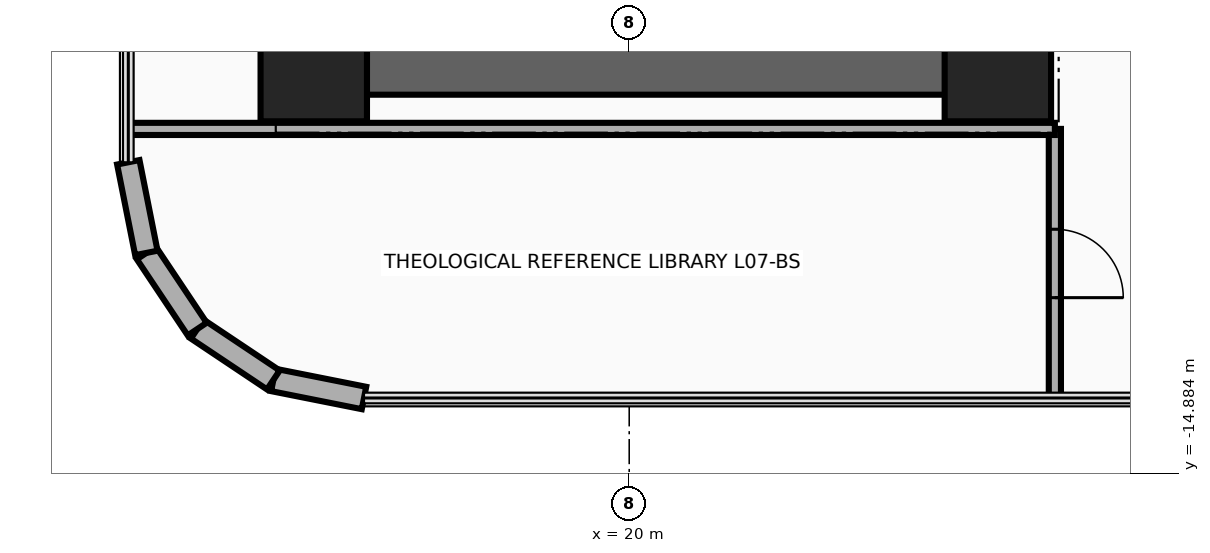
"""IFC4 building model, lengths in metres.
Left out: names, types, materials, properties, quantities, classifications, styles, units other than length and angle.
Written with IfcOpenShell. Run it as: python <this file> out.ifc"""

import sys

from ifc_helpers import new_model, si_unit, direction, frame, frame_2d, origin, origin_2d, place, context, subcontext, project, spatial, rectangle, extrude, source, transform, mapped, element, fill, save


model = new_model("IFC4")
c1 = context("Model", 3, precision=1e-05, world=origin(), true_north=direction((0.0, 1.0)))
c2 = subcontext(c1, "Body", "Model", "MODEL_VIEW")
j1 = project(units=[si_unit("LENGTHUNIT", "METRE"), si_unit("PLANEANGLEUNIT", "RADIAN")], contexts=[c1])
p1 = place(None, origin())
s1 = spatial("IfcSite", under=j1, at=p1, CompositionType="ELEMENT")
p2 = place(p1, origin())
s2 = spatial("IfcBuilding", under=s1, at=p2, CompositionType="ELEMENT")
p3 = place(p2, frame((0.0, 0.0, 33.4)))
s3 = spatial("IfcBuildingStorey", under=s2, at=p3, CompositionType="ELEMENT", Elevation=33.4)
p4 = place(p3, frame((24.85, -9.9, 0.0), z_axis=(0.0, 0.0, 1.0), x_axis=(0.0, 1.0, 0.0)))
e1 = element("IfcWall", 1, at=p4, inside=s3, PredefinedType="SHEAR", context=c2, shape_type="SweptSolid", body=[
    extrude(rectangle(XDim=8.95, YDim=0.7, at=frame_2d((4.475, 0.0))), origin(), (0.0, 0.0, 1.0), 3.46),
])
p5 = place(p3, frame((15.85, -9.55, 0.0), z_axis=(0.0, 0.0, 1.0), x_axis=(1.0, 0.0, 0.0)))
e2 = element("IfcWall", 2, at=p5, inside=s3, PredefinedType="SHEAR", context=c2, shape_type="SweptSolid", body=[
    extrude(rectangle(XDim=9.0, YDim=0.7, at=frame_2d((4.5, 0.0))), origin(), (0.0, 0.0, 1.0), 3.46),
])
m1 = source(origin(), c2, "Body", "SweptSolid", [
    extrude(rectangle(XDim=1.4, YDim=1.4, at=origin_2d()), origin(), (0.0, 0.0, 1.0), 3.7),
])
for number, where, z_axis, x_axis in (
    (3, (15.85, -9.55, 0.0), (0.0, 0.0, 1.0), (1.0, 0.0, 0.0)),
    (4, (24.85, -9.55, 0.0), (0.0, 0.0, 1.0), (1.0, 0.0, 0.0)),
):
    element("IfcColumn", number, at=place(p3, frame(where, z_axis=z_axis, x_axis=x_axis)), inside=s3, PredefinedType="COLUMN", context=c2, shape_type="MappedRepresentation", body=[
        mapped(m1, transform((0.0, 0.0, 0.0), x_axis=(1.0, 0.0, 0.0), y_axis=(0.0, 1.0, 0.0), z_axis=(0.0, 0.0, 1.0), scale=1.0)),
    ])
p6 = place(p3, frame((16.511, -13.89, 0.0), z_axis=(0.0, 0.0, 1.0), x_axis=(-0.980804027463, 0.194996050505, 0.0)))
e5 = element("IfcWall", 5, at=p6, inside=s3, PredefinedType="SOLIDWALL", context=c2, shape_type="SweptSolid", body=[
    extrude(rectangle(XDim=1.216, YDim=0.3, at=frame_2d((0.608, 0.0))), origin(), (0.0, 0.0, 1.0), 3.46),
])
for number, where, z_axis, x_axis in (
    (6, (15.318, -13.653, 0.0), (0.0, 0.0, 1.0), (-0.831, 0.556, 0.0)),
    (7, (14.317, -12.983, 0.0), (0.0, 0.0, 1.0), (-0.556, 0.831, 0.0)),
):
    element("IfcWall", number, at=place(p3, frame(where, z_axis=z_axis, x_axis=x_axis)), inside=s3, PredefinedType="SOLIDWALL", context=c2, shape_type="SweptSolid", body=[
        extrude(rectangle(XDim=1.205, YDim=0.3, at=frame_2d((0.603, 0.0))), origin(), (0.0, 0.0, 1.0), 3.46),
    ])
p7 = place(p3, frame((13.647, -11.982, 0.0), z_axis=(0.0, 0.0, 1.0), x_axis=(-0.195189223115, 0.980765602568, 0.0)))
e8 = element("IfcWall", 8, at=p7, inside=s3, PredefinedType="SOLIDWALL", context=c2, shape_type="SweptSolid", body=[
    extrude(rectangle(XDim=1.216, YDim=0.3, at=frame_2d((0.608, 0.0))), origin(), (0.0, 0.0, 1.0), 3.46),
])
p8 = place(p3, frame((25.6, -13.89, 0.0), z_axis=(0.0, 0.0, 1.0), x_axis=(0.0, 1.0, 0.0)))
e9 = element("IfcWall", 9, at=p8, inside=s3, PredefinedType="PARTITIONING", context=c2, shape_type="SweptSolid", body=[
    extrude(rectangle(XDim=3.54, YDim=0.16, at=frame_2d((1.77, 0.0))), origin(), (0.0, 0.0, 1.0), 3.46),
])
p9 = place(p8, frame((1.32, 0.0, 0.0)))
e10 = element("IfcOpeningElement", 10, at=p9, cuts=e9, PredefinedType="OPENING", context=c2, shape_type="SweptSolid", body=[
    extrude(rectangle(XDim=0.9, YDim=2.1, at=frame_2d((0.45, 1.05))), frame((0.0, 0.095, 0.0), z_axis=(0.0, -1.0, 0.0), x_axis=(1.0, 0.0, 0.0)), (0.0, 0.0, 1.0), 0.19),
])
p10 = place(p3, frame((13.41, -10.35, 0.0), z_axis=(0.0, 0.0, 1.0), x_axis=(1.0, 0.0, 0.0)))
e11 = element("IfcWall", 11, at=p10, inside=s3, PredefinedType="PARTITIONING", context=c2, shape_type="SweptSolid", body=[
    extrude(rectangle(XDim=12.19, YDim=0.16, at=frame_2d((6.095, 0.0))), origin(), (0.0, 0.0, 1.0), 3.46),
])
p11 = place(p9, frame((0.9, 0.0, 0.0), z_axis=(0.0, 0.0, 1.0), x_axis=(-1.0, 0.0, 0.0)))
e12 = element("IfcDoor", 12, at=p11, inside=s3, OperationType="SINGLE_SWING_LEFT", PredefinedType="DOOR", context=c2, shape_type="SweptSolid", body=[
    extrude(rectangle(XDim=0.9, YDim=2.1, at=frame_2d((0.45, 1.05))), frame((0.0, 0.025, 0.0), z_axis=(0.0, -1.0, 0.0), x_axis=(1.0, 0.0, 0.0)), (0.0, 0.0, 1.0), 0.05),
])
fill(e10, e12)
save(model, sys.argv[1])
